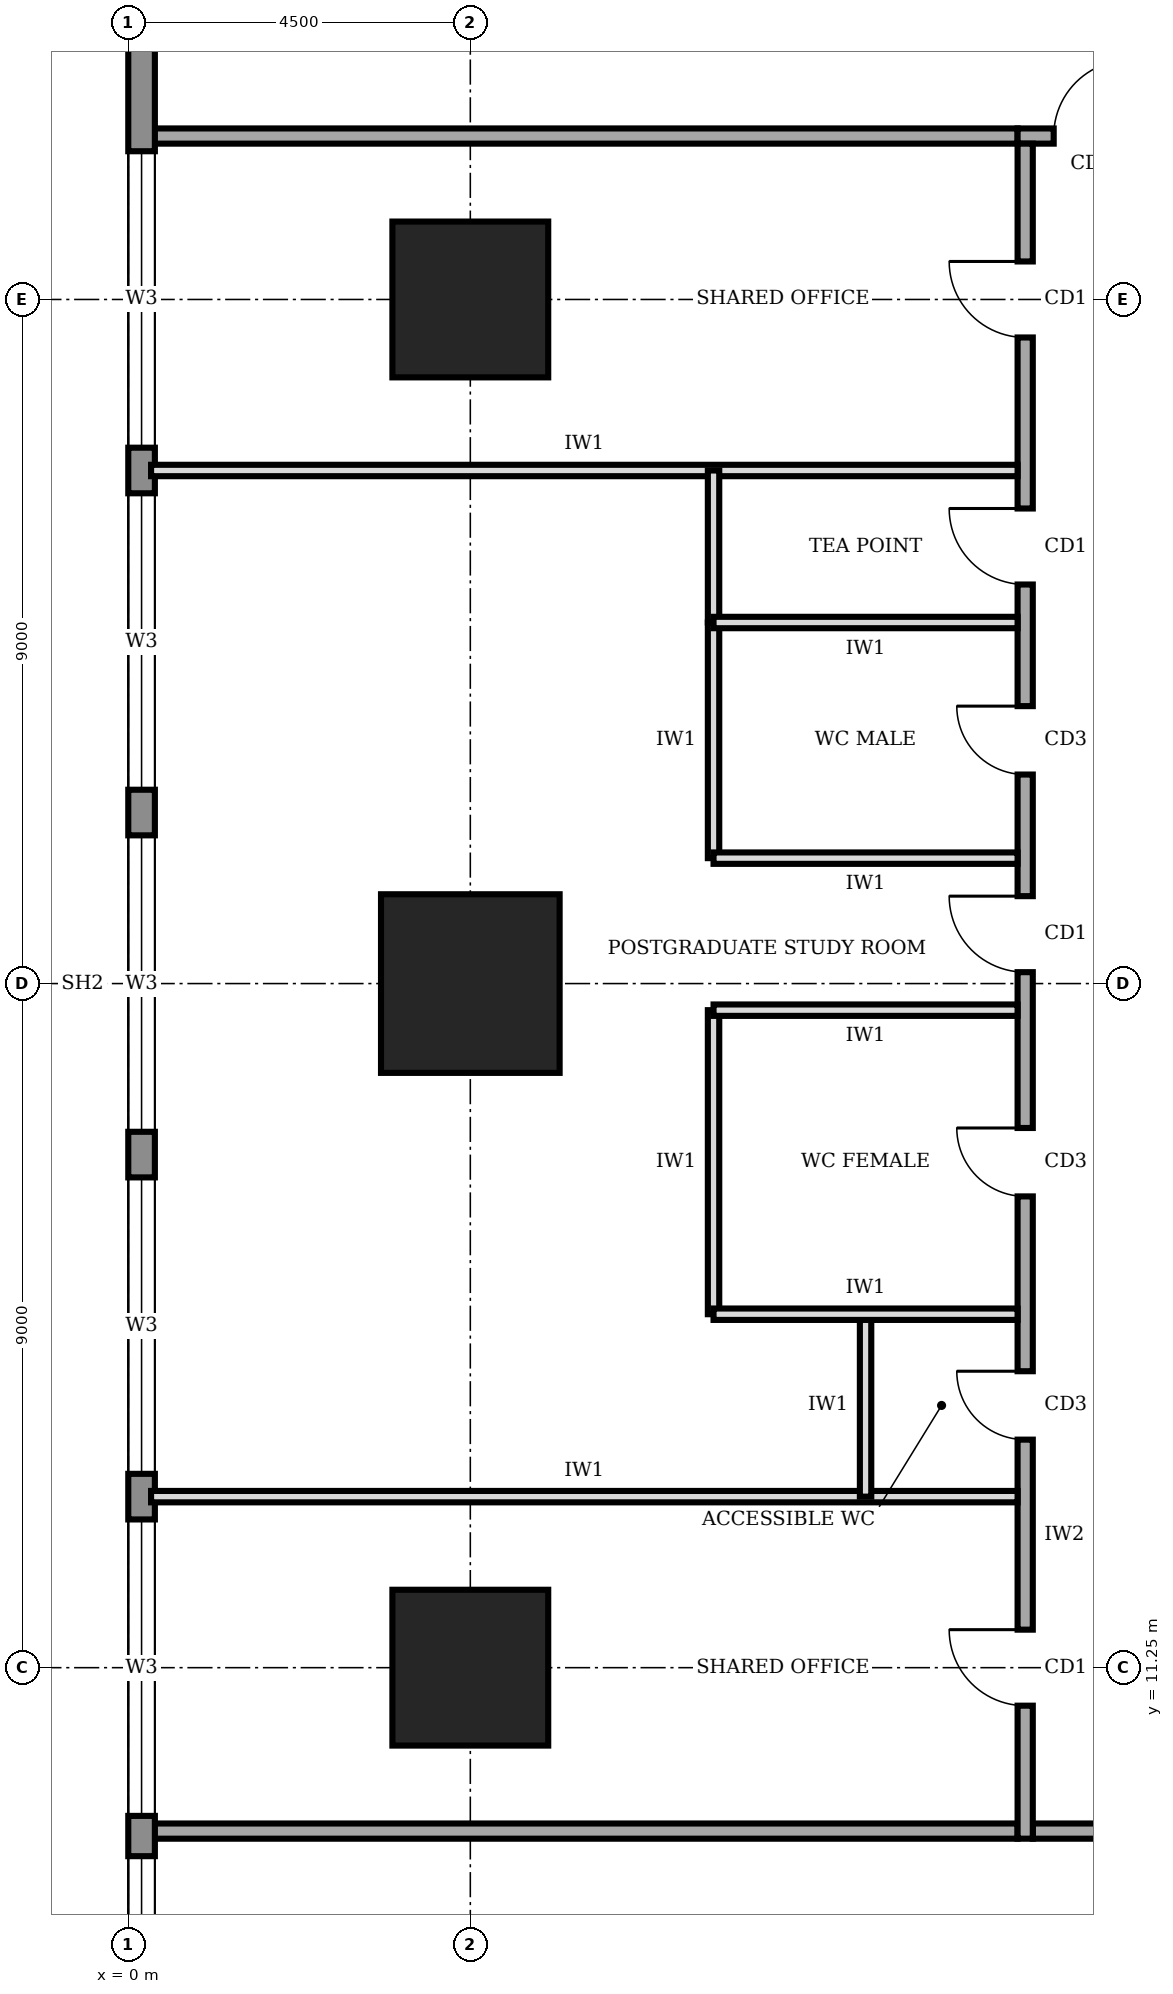
"""IFC4 building model, lengths in metres.
Left out: names, types, materials, properties, quantities, classifications, styles, units other than length and angle.
Written with IfcOpenShell. Run it as: python <this file> out.ifc"""

import sys

from ifc_helpers import new_model, si_unit, direction, frame, frame_2d, origin, origin_2d, place, context, subcontext, project, spatial, rectangle, extrude, element, fill, save


model = new_model("IFC4")
c1 = context("Model", 3, precision=1e-05, world=origin(), true_north=direction((0.0, 1.0)))
c2 = subcontext(c1, "Body", "Model", "MODEL_VIEW")
j1 = project(units=[si_unit("LENGTHUNIT", "METRE"), si_unit("PLANEANGLEUNIT", "RADIAN")], contexts=[c1])
p1 = place(None, origin())
s1 = spatial("IfcSite", under=j1, at=p1, CompositionType="ELEMENT")
p2 = place(p1, origin())
s2 = spatial("IfcBuilding", under=s1, at=p2, CompositionType="ELEMENT")
p3 = place(p2, frame((0.0, 0.0, 177.0)))
s3 = spatial("IfcBuildingStorey", under=s2, at=p3, CompositionType="ELEMENT", Elevation=177.0)
p4 = place(p3, frame((4.5, 11.25, 0.0), z_axis=(0.0, 0.0, 1.0), x_axis=(1.0, 0.0, 0.0)))
e1 = element("IfcColumn", 1, at=p4, inside=s3, PredefinedType="COLUMN", context=c2, shape_type="SweptSolid", body=[
    extrude(rectangle(XDim=2.05, YDim=2.05, at=origin_2d()), origin(), (0.0, 0.0, 1.0), 4.0),
])
p5 = place(p3, frame((4.5, 20.25, 0.0), z_axis=(0.0, 0.0, 1.0), x_axis=(1.0, 0.0, 0.0)))
e2 = element("IfcColumn", 2, at=p5, inside=s3, PredefinedType="COLUMN", context=c2, shape_type="SweptSolid", body=[
    extrude(rectangle(XDim=2.35, YDim=2.35, at=origin_2d()), origin(), (0.0, 0.0, 1.0), 4.0),
])
p6 = place(p3, frame((4.5, 29.25, 0.0), z_axis=(0.0, 0.0, 1.0), x_axis=(1.0, 0.0, 0.0)))
e3 = element("IfcColumn", 3, at=p6, inside=s3, PredefinedType="COLUMN", context=c2, shape_type="SweptSolid", body=[
    extrude(rectangle(XDim=2.05, YDim=2.05, at=origin_2d()), origin(), (0.0, 0.0, 1.0), 4.0),
])
p7 = place(p3, frame((0.175, 35.98, 0.0), z_axis=(0.0, 0.0, 1.0), x_axis=(0.0, -1.0, 0.0)))
e4 = element("IfcWall", 4, at=p7, inside=s3, PredefinedType="STANDARD", context=c2, shape_type="SweptSolid", body=[
    extrude(rectangle(XDim=31.46, YDim=0.35, at=frame_2d((15.73, 0.0))), origin(), (0.0, 0.0, 1.0), 3.75),
])
p8 = place(p7, frame((27.21, 0.0, 0.95)))
e5 = element("IfcOpeningElement", 5, at=p8, cuts=e4, PredefinedType="OPENING", context=c2, shape_type="SweptSolid", body=[
    extrude(rectangle(XDim=3.9, YDim=1.8, at=frame_2d((1.95, 0.9))), frame((0.0, 0.185, 0.0), z_axis=(0.0, -1.0, 0.0), x_axis=(1.0, 0.0, 0.0)), (0.0, 0.0, 1.0), 0.37),
])
p9 = place(p7, frame((22.78, 0.0, 0.95)))
e6 = element("IfcOpeningElement", 6, at=p9, cuts=e4, PredefinedType="OPENING", context=c2, shape_type="SweptSolid", body=[
    extrude(rectangle(XDim=3.9, YDim=1.8, at=frame_2d((1.95, 0.9))), frame((0.0, 0.185, 0.0), z_axis=(0.0, -1.0, 0.0), x_axis=(1.0, 0.0, 0.0)), (0.0, 0.0, 1.0), 0.37),
])
p10 = place(p7, frame((18.28, 0.0, 0.95)))
e7 = element("IfcOpeningElement", 7, at=p10, cuts=e4, PredefinedType="OPENING", context=c2, shape_type="SweptSolid", body=[
    extrude(rectangle(XDim=3.9, YDim=1.8, at=frame_2d((1.95, 0.9))), frame((0.0, 0.185, 0.0), z_axis=(0.0, -1.0, 0.0), x_axis=(1.0, 0.0, 0.0)), (0.0, 0.0, 1.0), 0.37),
])
p11 = place(p7, frame((13.78, 0.0, 0.95)))
e8 = element("IfcOpeningElement", 8, at=p11, cuts=e4, PredefinedType="OPENING", context=c2, shape_type="SweptSolid", body=[
    extrude(rectangle(XDim=3.9, YDim=1.8, at=frame_2d((1.95, 0.9))), frame((0.0, 0.185, 0.0), z_axis=(0.0, -1.0, 0.0), x_axis=(1.0, 0.0, 0.0)), (0.0, 0.0, 1.0), 0.37),
])
p12 = place(p7, frame((9.28, 0.0, 0.95)))
e9 = element("IfcOpeningElement", 9, at=p12, cuts=e4, PredefinedType="OPENING", context=c2, shape_type="SweptSolid", body=[
    extrude(rectangle(XDim=3.9, YDim=1.8, at=frame_2d((1.95, 0.9))), frame((0.0, 0.185, 0.0), z_axis=(0.0, -1.0, 0.0), x_axis=(1.0, 0.0, 0.0)), (0.0, 0.0, 1.0), 0.37),
])
p13 = place(p7, frame((4.78, 0.0, 0.95)))
e10 = element("IfcOpeningElement", 10, at=p13, cuts=e4, PredefinedType="OPENING", context=c2, shape_type="SweptSolid", body=[
    extrude(rectangle(XDim=3.9, YDim=1.8, at=frame_2d((1.95, 0.9))), frame((0.0, 0.185, 0.0), z_axis=(0.0, -1.0, 0.0), x_axis=(1.0, 0.0, 0.0)), (0.0, 0.0, 1.0), 0.37),
])
p14 = place(p3, frame((11.9, 9.1, 0.0), z_axis=(0.0, 0.0, 1.0), x_axis=(1.0, 0.0, 0.0)))
e11 = element("IfcWall", 11, at=p14, inside=s3, PredefinedType="SOLIDWALL", context=c2, shape_type="SweptSolid", body=[
    extrude(rectangle(XDim=16.9, YDim=0.2, at=frame_2d((8.45, 0.0))), origin(), (0.0, 0.0, 1.0), 3.75),
])
p15 = place(p14, frame((15.425, 0.0, 0.0)))
e12 = element("IfcOpeningElement", 12, at=p15, cuts=e11, PredefinedType="OPENING", context=c2, shape_type="SweptSolid", body=[
    extrude(rectangle(XDim=1.0, YDim=2.1, at=frame_2d((0.5, 1.05))), frame((0.0, 0.11, 0.0), z_axis=(0.0, -1.0, 0.0), x_axis=(1.0, 0.0, 0.0)), (0.0, 0.0, 1.0), 0.22),
])
p16 = place(p3, frame((28.6, 31.4, 0.0), z_axis=(0.0, 0.0, 1.0), x_axis=(-1.0, 0.0, 0.0)))
e13 = element("IfcWall", 13, at=p16, inside=s3, PredefinedType="SOLIDWALL", context=c2, shape_type="SweptSolid", body=[
    extrude(rectangle(XDim=16.9, YDim=0.2, at=frame_2d((8.45, 0.0))), origin(), (0.0, 0.0, 1.0), 3.75),
])
p17 = place(p16, frame((15.425, 0.0, 0.0)))
e14 = element("IfcOpeningElement", 14, at=p17, cuts=e13, PredefinedType="OPENING", context=c2, shape_type="SweptSolid", body=[
    extrude(rectangle(XDim=1.0, YDim=2.1, at=frame_2d((0.5, 1.05))), frame((0.0, 0.11, 0.0), z_axis=(0.0, -1.0, 0.0), x_axis=(1.0, 0.0, 0.0)), (0.0, 0.0, 1.0), 0.22),
])
p18 = place(p16, frame((12.35, 0.0, 0.0)))
e15 = element("IfcOpeningElement", 15, at=p18, cuts=e13, PredefinedType="OPENING", context=c2, shape_type="SweptSolid", body=[
    extrude(rectangle(XDim=1.0, YDim=2.1, at=frame_2d((0.5, 1.05))), frame((0.0, 0.11, 0.0), z_axis=(0.0, -1.0, 0.0), x_axis=(1.0, 0.0, 0.0)), (0.0, 0.0, 1.0), 0.22),
])
p19 = place(p16, frame((5.6, 0.0, 0.0)))
e16 = element("IfcOpeningElement", 16, at=p19, cuts=e13, PredefinedType="OPENING", context=c2, shape_type="SweptSolid", body=[
    extrude(rectangle(XDim=1.0, YDim=2.1, at=frame_2d((0.5, 1.05))), frame((0.0, 0.11, 0.0), z_axis=(0.0, -1.0, 0.0), x_axis=(1.0, 0.0, 0.0)), (0.0, 0.0, 1.0), 0.22),
])
p20 = place(p16, frame((0.275, 0.0, 0.0)))
e17 = element("IfcOpeningElement", 17, at=p20, cuts=e13, PredefinedType="OPENING", context=c2, shape_type="SweptSolid", body=[
    extrude(rectangle(XDim=1.0, YDim=2.1, at=frame_2d((0.5, 1.05))), frame((0.0, 0.11, 0.0), z_axis=(0.0, -1.0, 0.0), x_axis=(1.0, 0.0, 0.0)), (0.0, 0.0, 1.0), 0.22),
])
p21 = place(p3, frame((11.8, 31.3, 0.0), z_axis=(0.0, 0.0, 1.0), x_axis=(0.0, -1.0, 0.0)))
e18 = element("IfcWall", 18, at=p21, inside=s3, PredefinedType="SOLIDWALL", context=c2, shape_type="SweptSolid", body=[
    extrude(rectangle(XDim=22.3, YDim=0.2, at=frame_2d((11.15, 0.0))), origin(), (0.0, 0.0, 1.0), 3.75),
])
p22 = place(p21, frame((19.55, 0.0, 0.0)))
e19 = element("IfcOpeningElement", 19, at=p22, cuts=e18, PredefinedType="OPENING", context=c2, shape_type="SweptSolid", body=[
    extrude(rectangle(XDim=1.0, YDim=2.1, at=frame_2d((0.5, 1.05))), frame((0.0, 0.11, 0.0), z_axis=(0.0, -1.0, 0.0), x_axis=(1.0, 0.0, 0.0)), (0.0, 0.0, 1.0), 0.22),
])
p23 = place(p21, frame((16.15, 0.0, 0.0)))
e20 = element("IfcOpeningElement", 20, at=p23, cuts=e18, PredefinedType="OPENING", context=c2, shape_type="SweptSolid", body=[
    extrude(rectangle(XDim=0.9, YDim=2.1, at=frame_2d((0.45, 1.05))), frame((0.0, 0.11, 0.0), z_axis=(0.0, -1.0, 0.0), x_axis=(1.0, 0.0, 0.0)), (0.0, 0.0, 1.0), 0.22),
])
p24 = place(p21, frame((12.95, 0.0, 0.0)))
e21 = element("IfcOpeningElement", 21, at=p24, cuts=e18, PredefinedType="OPENING", context=c2, shape_type="SweptSolid", body=[
    extrude(rectangle(XDim=0.9, YDim=2.1, at=frame_2d((0.45, 1.05))), frame((0.0, 0.11, 0.0), z_axis=(0.0, -1.0, 0.0), x_axis=(1.0, 0.0, 0.0)), (0.0, 0.0, 1.0), 0.22),
])
p25 = place(p21, frame((7.4, 0.0, 0.0)))
e22 = element("IfcOpeningElement", 22, at=p25, cuts=e18, PredefinedType="OPENING", context=c2, shape_type="SweptSolid", body=[
    extrude(rectangle(XDim=0.9, YDim=2.1, at=frame_2d((0.45, 1.05))), frame((0.0, 0.11, 0.0), z_axis=(0.0, -1.0, 0.0), x_axis=(1.0, 0.0, 0.0)), (0.0, 0.0, 1.0), 0.22),
])
p26 = place(p21, frame((4.8, 0.0, 0.0)))
e23 = element("IfcOpeningElement", 23, at=p26, cuts=e18, PredefinedType="OPENING", context=c2, shape_type="SweptSolid", body=[
    extrude(rectangle(XDim=1.0, YDim=2.1, at=frame_2d((0.5, 1.05))), frame((0.0, 0.11, 0.0), z_axis=(0.0, -1.0, 0.0), x_axis=(1.0, 0.0, 0.0)), (0.0, 0.0, 1.0), 0.22),
])
p27 = place(p21, frame((9.9, 0.0, 0.0)))
e24 = element("IfcOpeningElement", 24, at=p27, cuts=e18, PredefinedType="OPENING", context=c2, shape_type="SweptSolid", body=[
    extrude(rectangle(XDim=1.0, YDim=2.1, at=frame_2d((0.5, 1.05))), frame((0.0, 0.11, 0.0), z_axis=(0.0, -1.0, 0.0), x_axis=(1.0, 0.0, 0.0)), (0.0, 0.0, 1.0), 0.22),
])
p28 = place(p21, frame((1.55, 0.0, 0.0)))
e25 = element("IfcOpeningElement", 25, at=p28, cuts=e18, PredefinedType="OPENING", context=c2, shape_type="SweptSolid", body=[
    extrude(rectangle(XDim=1.0, YDim=2.1, at=frame_2d((0.5, 1.05))), frame((0.0, 0.11, 0.0), z_axis=(0.0, -1.0, 0.0), x_axis=(1.0, 0.0, 0.0)), (0.0, 0.0, 1.0), 0.22),
])
for number, where, z_axis, x_axis in (
    (26, (0.3, 9.1, 0.0), (0.0, 0.0, 1.0), (1.0, 0.0, 0.0)),
    (27, (0.3, 31.4, 0.0), (0.0, 0.0, 1.0), (1.0, 0.0, 0.0)),
):
    element("IfcWall", number, at=place(p3, frame(where, z_axis=z_axis, x_axis=x_axis)), inside=s3, PredefinedType="SOLIDWALL", context=c2, shape_type="SweptSolid", body=[
        extrude(rectangle(XDim=11.4, YDim=0.2, at=frame_2d((5.7, 0.0))), origin(), (0.0, 0.0, 1.0), 3.75),
    ])
for number, where, z_axis, x_axis in (
    (28, (0.3, 13.5, 0.0), (0.0, 0.0, 1.0), (1.0, 0.0, 0.0)),
    (29, (0.3, 27.0, 0.0), (0.0, 0.0, 1.0), (1.0, 0.0, 0.0)),
):
    element("IfcWall", number, at=place(p3, frame(where, z_axis=z_axis, x_axis=x_axis)), inside=s3, PredefinedType="PARTITIONING", context=c2, shape_type="SweptSolid", body=[
        extrude(rectangle(XDim=11.4, YDim=0.15, at=frame_2d((5.7, 0.0))), origin(), (0.0, 0.0, 1.0), 3.75),
    ])
p29 = place(p3, frame((11.7, 15.9, 0.0), z_axis=(0.0, 0.0, 1.0), x_axis=(-1.0, 0.0, 0.0)))
e30 = element("IfcWall", 30, at=p29, inside=s3, PredefinedType="PARTITIONING", context=c2, shape_type="SweptSolid", body=[
    extrude(rectangle(XDim=4.0, YDim=0.15, at=frame_2d((2.0, 0.0))), origin(), (0.0, 0.0, 1.0), 3.75),
])
p30 = place(p3, frame((11.7, 19.9, 0.0), z_axis=(0.0, 0.0, 1.0), x_axis=(-1.0, 0.0, 0.0)))
e31 = element("IfcWall", 31, at=p30, inside=s3, PredefinedType="PARTITIONING", context=c2, shape_type="SweptSolid", body=[
    extrude(rectangle(XDim=4.0, YDim=0.15, at=frame_2d((2.0, 0.0))), origin(), (0.0, 0.0, 1.0), 2.85),
])
for number, where, z_axis, x_axis in (
    (32, (11.7, 21.9, 0.0), (0.0, 0.0, 1.0), (-1.0, 0.0, 0.0)),
    (33, (11.7, 25.0, 0.0), (0.0, 0.0, 1.0), (-1.0, 0.0, 0.0)),
):
    element("IfcWall", number, at=place(p3, frame(where, z_axis=z_axis, x_axis=x_axis)), inside=s3, PredefinedType="PARTITIONING", context=c2, shape_type="SweptSolid", body=[
        extrude(rectangle(XDim=4.0, YDim=0.15, at=frame_2d((2.0, 0.0))), origin(), (0.0, 0.0, 1.0), 3.75),
    ])
p31 = place(p3, frame((9.7, 13.5, 0.0), z_axis=(0.0, 0.0, 1.0), x_axis=(0.0, 1.0, 0.0)))
e34 = element("IfcWall", 34, at=p31, inside=s3, PredefinedType="PARTITIONING", context=c2, shape_type="SweptSolid", body=[
    extrude(rectangle(XDim=2.4, YDim=0.15, at=frame_2d((1.2, 0.0))), origin(), (0.0, 0.0, 1.0), 3.75),
])
p32 = place(p3, frame((7.7, 15.9, 0.0), z_axis=(0.0, 0.0, 1.0), x_axis=(0.0, 1.0, 0.0)))
e35 = element("IfcWall", 35, at=p32, inside=s3, PredefinedType="PARTITIONING", context=c2, shape_type="SweptSolid", body=[
    extrude(rectangle(XDim=4.0, YDim=0.15, at=frame_2d((2.0, 0.0))), origin(), (0.0, 0.0, 1.0), 3.75),
])
p33 = place(p3, frame((7.7, 21.9, 0.0), z_axis=(0.0, 0.0, 1.0), x_axis=(0.0, 1.0, 0.0)))
e36 = element("IfcWall", 36, at=p33, inside=s3, PredefinedType="PARTITIONING", context=c2, shape_type="SweptSolid", body=[
    extrude(rectangle(XDim=3.1, YDim=0.15, at=frame_2d((1.55, 0.0))), origin(), (0.0, 0.0, 1.0), 3.75),
])
p34 = place(p3, frame((7.7, 25.0, 0.0), z_axis=(0.0, 0.0, 1.0), x_axis=(0.0, 1.0, 0.0)))
e37 = element("IfcWall", 37, at=p34, inside=s3, PredefinedType="PARTITIONING", context=c2, shape_type="SweptSolid", body=[
    extrude(rectangle(XDim=2.0, YDim=0.15, at=frame_2d((1.0, 0.0))), origin(), (0.0, 0.0, 1.0), 3.75),
])
p35 = place(p8, origin())
e38 = element("IfcWindow", 38, at=p35, inside=s3, PartitioningType="SINGLE_PANEL", PredefinedType="WINDOW", context=c2, shape_type="SweptSolid", body=[
    extrude(rectangle(XDim=3.9, YDim=1.8, at=frame_2d((1.95, 0.9))), frame((0.0, 0.03, 0.0), z_axis=(0.0, -1.0, 0.0), x_axis=(1.0, 0.0, 0.0)), (0.0, 0.0, 1.0), 0.06),
])
fill(e5, e38)
p36 = place(p9, origin())
e39 = element("IfcWindow", 39, at=p36, inside=s3, PartitioningType="SINGLE_PANEL", PredefinedType="WINDOW", context=c2, shape_type="SweptSolid", body=[
    extrude(rectangle(XDim=3.9, YDim=1.8, at=frame_2d((1.95, 0.9))), frame((0.0, 0.03, 0.0), z_axis=(0.0, -1.0, 0.0), x_axis=(1.0, 0.0, 0.0)), (0.0, 0.0, 1.0), 0.06),
])
fill(e6, e39)
p37 = place(p10, origin())
e40 = element("IfcWindow", 40, at=p37, inside=s3, PartitioningType="SINGLE_PANEL", PredefinedType="WINDOW", context=c2, shape_type="SweptSolid", body=[
    extrude(rectangle(XDim=3.9, YDim=1.8, at=frame_2d((1.95, 0.9))), frame((0.0, 0.03, 0.0), z_axis=(0.0, -1.0, 0.0), x_axis=(1.0, 0.0, 0.0)), (0.0, 0.0, 1.0), 0.06),
])
fill(e7, e40)
p38 = place(p11, origin())
e41 = element("IfcWindow", 41, at=p38, inside=s3, PartitioningType="SINGLE_PANEL", PredefinedType="WINDOW", context=c2, shape_type="SweptSolid", body=[
    extrude(rectangle(XDim=3.9, YDim=1.8, at=frame_2d((1.95, 0.9))), frame((0.0, 0.03, 0.0), z_axis=(0.0, -1.0, 0.0), x_axis=(1.0, 0.0, 0.0)), (0.0, 0.0, 1.0), 0.06),
])
fill(e8, e41)
p39 = place(p12, origin())
e42 = element("IfcWindow", 42, at=p39, inside=s3, PartitioningType="SINGLE_PANEL", PredefinedType="WINDOW", context=c2, shape_type="SweptSolid", body=[
    extrude(rectangle(XDim=3.9, YDim=1.8, at=frame_2d((1.95, 0.9))), frame((0.0, 0.03, 0.0), z_axis=(0.0, -1.0, 0.0), x_axis=(1.0, 0.0, 0.0)), (0.0, 0.0, 1.0), 0.06),
])
fill(e9, e42)
p40 = place(p13, origin())
e43 = element("IfcWindow", 43, at=p40, inside=s3, PartitioningType="SINGLE_PANEL", PredefinedType="WINDOW", context=c2, shape_type="SweptSolid", body=[
    extrude(rectangle(XDim=3.9, YDim=1.8, at=frame_2d((1.95, 0.9))), frame((0.0, 0.03, 0.0), z_axis=(0.0, -1.0, 0.0), x_axis=(1.0, 0.0, 0.0)), (0.0, 0.0, 1.0), 0.06),
])
fill(e10, e43)
p41 = place(p17, frame((1.0, 0.0, 0.0), z_axis=(0.0, 0.0, 1.0), x_axis=(-1.0, 0.0, 0.0)))
e44 = element("IfcDoor", 44, at=p41, inside=s3, OperationType="SINGLE_SWING_RIGHT", PredefinedType="DOOR", context=c2, shape_type="SweptSolid", body=[
    extrude(rectangle(XDim=1.0, YDim=2.1, at=frame_2d((0.5, 1.05))), frame((0.0, 0.025, 0.0), z_axis=(0.0, -1.0, 0.0), x_axis=(1.0, 0.0, 0.0)), (0.0, 0.0, 1.0), 0.05),
])
fill(e14, e44)
p42 = place(p22, frame((1.0, 0.0, 0.0), z_axis=(0.0, 0.0, 1.0), x_axis=(-1.0, 0.0, 0.0)))
e45 = element("IfcDoor", 45, at=p42, inside=s3, OperationType="SINGLE_SWING_RIGHT", PredefinedType="DOOR", context=c2, shape_type="SweptSolid", body=[
    extrude(rectangle(XDim=1.0, YDim=2.1, at=frame_2d((0.5, 1.05))), frame((0.0, 0.025, 0.0), z_axis=(0.0, -1.0, 0.0), x_axis=(1.0, 0.0, 0.0)), (0.0, 0.0, 1.0), 0.05),
])
fill(e19, e45)
p43 = place(p23, frame((0.9, 0.0, 0.0), z_axis=(0.0, 0.0, 1.0), x_axis=(-1.0, 0.0, 0.0)))
e46 = element("IfcDoor", 46, at=p43, inside=s3, OperationType="SINGLE_SWING_RIGHT", PredefinedType="DOOR", context=c2, shape_type="SweptSolid", body=[
    extrude(rectangle(XDim=0.9, YDim=2.1, at=frame_2d((0.45, 1.05))), frame((0.0, 0.025, 0.0), z_axis=(0.0, -1.0, 0.0), x_axis=(1.0, 0.0, 0.0)), (0.0, 0.0, 1.0), 0.05),
])
fill(e20, e46)
p44 = place(p24, frame((0.9, 0.0, 0.0), z_axis=(0.0, 0.0, 1.0), x_axis=(-1.0, 0.0, 0.0)))
e47 = element("IfcDoor", 47, at=p44, inside=s3, OperationType="SINGLE_SWING_RIGHT", PredefinedType="DOOR", context=c2, shape_type="SweptSolid", body=[
    extrude(rectangle(XDim=0.9, YDim=2.1, at=frame_2d((0.45, 1.05))), frame((0.0, 0.025, 0.0), z_axis=(0.0, -1.0, 0.0), x_axis=(1.0, 0.0, 0.0)), (0.0, 0.0, 1.0), 0.05),
])
fill(e21, e47)
p45 = place(p25, frame((0.9, 0.0, 0.0), z_axis=(0.0, 0.0, 1.0), x_axis=(-1.0, 0.0, 0.0)))
e48 = element("IfcDoor", 48, at=p45, inside=s3, OperationType="SINGLE_SWING_RIGHT", PredefinedType="DOOR", context=c2, shape_type="SweptSolid", body=[
    extrude(rectangle(XDim=0.9, YDim=2.1, at=frame_2d((0.45, 1.05))), frame((0.0, 0.025, 0.0), z_axis=(0.0, -1.0, 0.0), x_axis=(1.0, 0.0, 0.0)), (0.0, 0.0, 1.0), 0.05),
])
fill(e22, e48)
p46 = place(p26, frame((1.0, 0.0, 0.0), z_axis=(0.0, 0.0, 1.0), x_axis=(-1.0, 0.0, 0.0)))
e49 = element("IfcDoor", 49, at=p46, inside=s3, OperationType="SINGLE_SWING_RIGHT", PredefinedType="DOOR", context=c2, shape_type="SweptSolid", body=[
    extrude(rectangle(XDim=1.0, YDim=2.1, at=frame_2d((0.5, 1.05))), frame((0.0, 0.025, 0.0), z_axis=(0.0, -1.0, 0.0), x_axis=(1.0, 0.0, 0.0)), (0.0, 0.0, 1.0), 0.05),
])
fill(e23, e49)
p47 = place(p27, frame((1.0, 0.0, 0.0), z_axis=(0.0, 0.0, 1.0), x_axis=(-1.0, 0.0, 0.0)))
e50 = element("IfcDoor", 50, at=p47, inside=s3, OperationType="SINGLE_SWING_RIGHT", PredefinedType="DOOR", context=c2, shape_type="SweptSolid", body=[
    extrude(rectangle(XDim=1.0, YDim=2.1, at=frame_2d((0.5, 1.05))), frame((0.0, 0.025, 0.0), z_axis=(0.0, -1.0, 0.0), x_axis=(1.0, 0.0, 0.0)), (0.0, 0.0, 1.0), 0.05),
])
fill(e24, e50)
p48 = place(p28, frame((1.0, 0.0, 0.0), z_axis=(0.0, 0.0, 1.0), x_axis=(-1.0, 0.0, 0.0)))
e51 = element("IfcDoor", 51, at=p48, inside=s3, OperationType="SINGLE_SWING_RIGHT", PredefinedType="DOOR", context=c2, shape_type="SweptSolid", body=[
    extrude(rectangle(XDim=1.0, YDim=2.1, at=frame_2d((0.5, 1.05))), frame((0.0, 0.025, 0.0), z_axis=(0.0, -1.0, 0.0), x_axis=(1.0, 0.0, 0.0)), (0.0, 0.0, 1.0), 0.05),
])
fill(e25, e51)
save(model, sys.argv[1])
